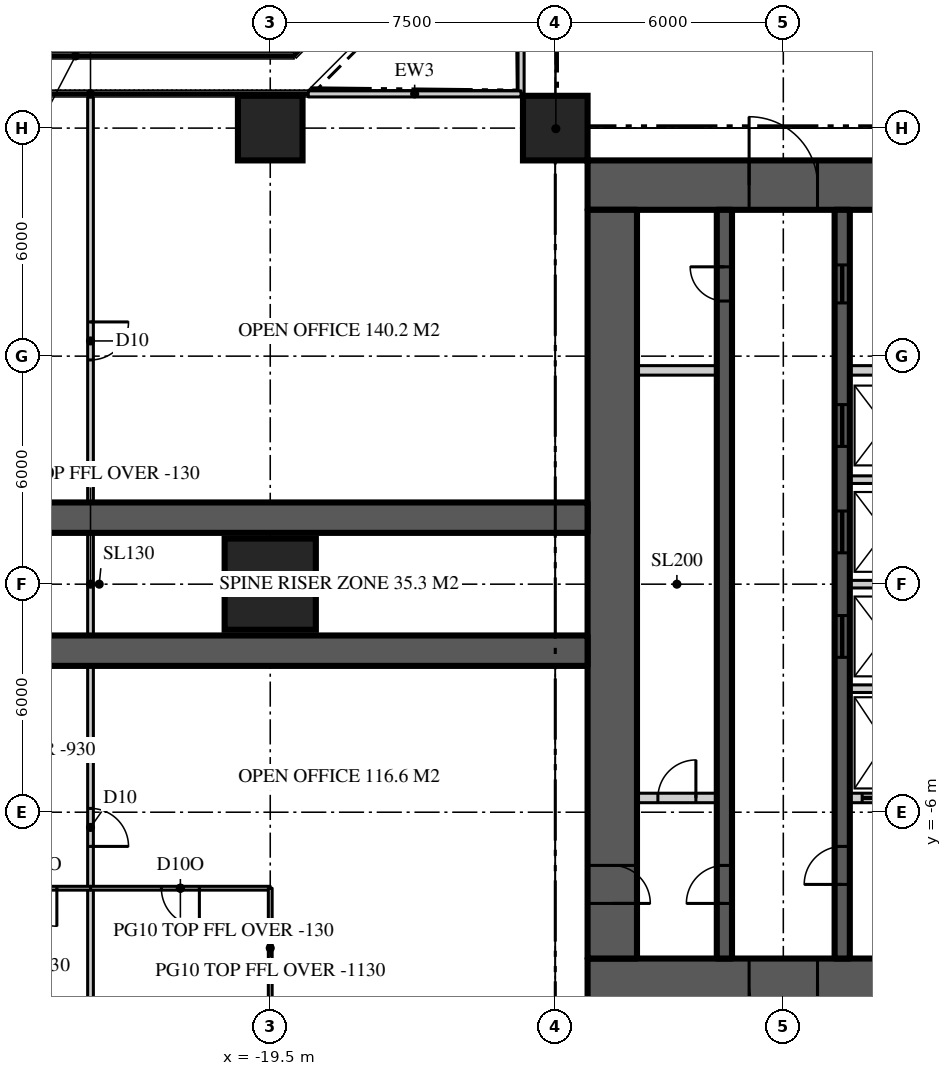
"""IFC4 building model, lengths in metres.
Left out: names, types, materials, properties, quantities, classifications, styles, units other than length and angle.
Written with IfcOpenShell. Run it as: python <this file> out.ifc"""

import sys

from ifc_helpers import new_model, si_unit, direction, frame, frame_2d, origin, origin_2d, place, context, subcontext, project, spatial, rectangle, extrude, element, fill, save


model = new_model("IFC4")
c1 = context("Model", 3, precision=1e-05, world=origin(), true_north=direction((0.0, 1.0)))
c2 = subcontext(c1, "Body", "Model", "MODEL_VIEW")
j1 = project(units=[si_unit("LENGTHUNIT", "METRE"), si_unit("PLANEANGLEUNIT", "RADIAN")], contexts=[c1])
p1 = place(None, origin())
s1 = spatial("IfcSite", under=j1, at=p1, CompositionType="ELEMENT")
p2 = place(p1, origin())
s2 = spatial("IfcBuilding", under=s1, at=p2, CompositionType="ELEMENT")
p3 = place(p2, frame((0.0, 0.0, 186.6)))
s3 = spatial("IfcBuildingStorey", under=s2, at=p3, CompositionType="ELEMENT", Elevation=186.6)
p4 = place(p3, frame((-11.15, 10.5, 0.0), z_axis=(0.0, 0.0, 1.0), x_axis=(1.0, 0.0, 0.0)))
e1 = element("IfcWall", 1, at=p4, inside=s3, PredefinedType="SHEAR", context=c2, shape_type="SweptSolid", body=[
    extrude(rectangle(XDim=22.3, YDim=1.3, at=frame_2d((11.15, 0.0))), origin(), (0.0, 0.0, 1.0), 3.9),
])
p5 = place(p4, frame((4.25, 0.0, 0.0)))
e2 = element("IfcOpeningElement", 2, at=p5, cuts=e1, PredefinedType="OPENING", context=c2, shape_type="SweptSolid", body=[
    extrude(rectangle(XDim=1.8, YDim=2.2, at=frame_2d((0.9, 1.1))), frame((0.0, 0.66, 0.0), z_axis=(0.0, -1.0, 0.0), x_axis=(1.0, 0.0, 0.0)), (0.0, 0.0, 1.0), 1.32),
])
p6 = place(p4, frame((16.25, 0.0, 0.0)))
e3 = element("IfcOpeningElement", 3, at=p6, cuts=e1, PredefinedType="OPENING", context=c2, shape_type="SweptSolid", body=[
    extrude(rectangle(XDim=1.8, YDim=2.2, at=frame_2d((0.9, 1.1))), frame((0.0, 0.66, 0.0), z_axis=(0.0, -1.0, 0.0), x_axis=(1.0, 0.0, 0.0)), (0.0, 0.0, 1.0), 1.32),
])
p7 = place(p3, frame((11.15, -10.5, 0.0), z_axis=(0.0, 0.0, 1.0), x_axis=(-1.0, 0.0, 0.0)))
e4 = element("IfcWall", 4, at=p7, inside=s3, PredefinedType="SHEAR", context=c2, shape_type="SweptSolid", body=[
    extrude(rectangle(XDim=22.3, YDim=1.3, at=frame_2d((11.15, 0.0))), origin(), (0.0, 0.0, 1.0), 3.9),
])
p8 = place(p7, frame((16.25, 0.0, 0.0)))
e5 = element("IfcOpeningElement", 5, at=p8, cuts=e4, PredefinedType="OPENING", context=c2, shape_type="SweptSolid", body=[
    extrude(rectangle(XDim=1.8, YDim=2.2, at=frame_2d((0.9, 1.1))), frame((0.0, 0.66, 0.0), z_axis=(0.0, -1.0, 0.0), x_axis=(1.0, 0.0, 0.0)), (0.0, 0.0, 1.0), 1.32),
])
p9 = place(p7, frame((4.25, 0.0, 0.0)))
e6 = element("IfcOpeningElement", 6, at=p9, cuts=e4, PredefinedType="OPENING", context=c2, shape_type="SweptSolid", body=[
    extrude(rectangle(XDim=1.8, YDim=2.2, at=frame_2d((0.9, 1.1))), frame((0.0, 0.66, 0.0), z_axis=(0.0, -1.0, 0.0), x_axis=(1.0, 0.0, 0.0)), (0.0, 0.0, 1.0), 1.32),
])
p10 = place(p3, frame((-10.5, 9.85, 0.0), z_axis=(0.0, 0.0, 1.0), x_axis=(0.0, -1.0, 0.0)))
e7 = element("IfcWall", 7, at=p10, inside=s3, PredefinedType="SHEAR", context=c2, shape_type="SweptSolid", body=[
    extrude(rectangle(XDim=19.7, YDim=1.3, at=frame_2d((9.85, 0.0))), origin(), (0.0, 0.0, 1.0), 3.9),
])
p11 = place(p10, frame((17.25, 0.0, 0.0)))
e8 = element("IfcOpeningElement", 8, at=p11, cuts=e7, PredefinedType="OPENING", context=c2, shape_type="SweptSolid", body=[
    extrude(rectangle(XDim=1.0, YDim=2.2, at=frame_2d((0.5, 1.1))), frame((0.0, 0.66, 0.0), z_axis=(0.0, -1.0, 0.0), x_axis=(1.0, 0.0, 0.0)), (0.0, 0.0, 1.0), 1.32),
])
for number, where, z_axis, x_axis in (
    (9, (-11.15, 1.75, 0.0), (0.0, 0.0, 1.0), (-1.0, 0.0, 0.0)),
    (10, (-11.15, -1.75, 0.0), (0.0, 0.0, 1.0), (-1.0, 0.0, 0.0)),
):
    element("IfcWall", number, at=place(p3, frame(where, z_axis=z_axis, x_axis=x_axis)), inside=s3, PredefinedType="SHEAR", context=c2, shape_type="SweptSolid", body=[
        extrude(rectangle(XDim=15.25, YDim=0.8, at=frame_2d((7.625, 0.0))), origin(), (0.0, 0.0, 1.0), 3.9),
    ])
p12 = place(p3, frame((-19.5, 0.0, 0.0), z_axis=(0.0, 0.0, 1.0), x_axis=(1.0, 0.0, 0.0)))
e11 = element("IfcColumn", 11, at=p12, inside=s3, PredefinedType="COLUMN", context=c2, shape_type="SweptSolid", body=[
    extrude(rectangle(XDim=2.4, YDim=2.4, at=origin_2d()), origin(), (0.0, 0.0, 1.0), 3.9),
])
for number, where, z_axis, x_axis in (
    (12, (-19.5, 12.0, 0.0), (0.0, 0.0, 1.0), (1.0, 0.0, 0.0)),
    (13, (-12.0, 12.0, 0.0), (0.0, 0.0, 1.0), (1.0, 0.0, 0.0)),
):
    element("IfcColumn", number, at=place(p3, frame(where, z_axis=z_axis, x_axis=x_axis)), inside=s3, PredefinedType="COLUMN", context=c2, shape_type="SweptSolid", body=[
        extrude(rectangle(XDim=1.7, YDim=1.7, at=origin_2d()), origin(), (0.0, 0.0, 1.0), 3.9),
    ])
p13 = place(p3, frame((-12.9, 18.5, 0.0), z_axis=(0.0, 0.0, 1.0), x_axis=(0.0, -1.0, 0.0)))
e14 = element("IfcWall", 14, at=p13, inside=s3, PredefinedType="SOLIDWALL", context=c2, shape_type="SweptSolid", body=[
    extrude(rectangle(XDim=5.6, YDim=0.16, at=frame_2d((2.8, 0.0))), origin(), (0.0, 0.0, 1.0), 3.77),
])
p14 = place(p13, frame((2.3, 0.0, 0.0)))
e15 = element("IfcOpeningElement", 15, at=p14, cuts=e14, PredefinedType="OPENING", context=c2, shape_type="SweptSolid", body=[
    extrude(rectangle(XDim=1.0, YDim=2.2, at=frame_2d((0.5, 1.1))), frame((0.0, 0.09, 0.0), z_axis=(0.0, -1.0, 0.0), x_axis=(1.0, 0.0, 0.0)), (0.0, 0.0, 1.0), 0.18),
])
p15 = place(p3, frame((-12.9, 12.9, 0.0), z_axis=(0.0, 0.0, 1.0), x_axis=(-1.0, 0.0, 0.0)))
e16 = element("IfcWall", 16, at=p15, inside=s3, PredefinedType="SOLIDWALL", context=c2, shape_type="SweptSolid", body=[
    extrude(rectangle(XDim=5.6, YDim=0.16, at=frame_2d((2.8, 0.0))), origin(), (0.0, 0.0, 1.0), 3.77),
])
p16 = place(p3, frame((-7.55, -9.85, 0.0), z_axis=(0.0, 0.0, 1.0), x_axis=(0.0, 1.0, 0.0)))
e17 = element("IfcWall", 17, at=p16, inside=s3, PredefinedType="SHEAR", context=c2, shape_type="SweptSolid", body=[
    extrude(rectangle(XDim=19.7, YDim=0.4, at=frame_2d((9.85, 0.0))), origin(), (0.0, 0.0, 1.0), 3.9),
])
p17 = place(p16, frame((1.45, 0.0, 0.0)))
e18 = element("IfcOpeningElement", 18, at=p17, cuts=e17, PredefinedType="OPENING", context=c2, shape_type="SweptSolid", body=[
    extrude(rectangle(XDim=1.0, YDim=2.2, at=frame_2d((0.5, 1.1))), frame((0.0, 0.21, 0.0), z_axis=(0.0, -1.0, 0.0), x_axis=(1.0, 0.0, 0.0)), (0.0, 0.0, 1.0), 0.42),
])
p18 = place(p16, frame((17.3, 0.0, 0.0)))
e19 = element("IfcOpeningElement", 19, at=p18, cuts=e17, PredefinedType="OPENING", context=c2, shape_type="SweptSolid", body=[
    extrude(rectangle(XDim=0.9, YDim=2.1, at=frame_2d((0.45, 1.05))), frame((0.0, 0.21, 0.0), z_axis=(0.0, -1.0, 0.0), x_axis=(1.0, 0.0, 0.0)), (0.0, 0.0, 1.0), 0.42),
])
p19 = place(p3, frame((-4.45, -9.85, 0.0), z_axis=(0.0, 0.0, 1.0), x_axis=(0.0, 1.0, 0.0)))
e20 = element("IfcWall", 20, at=p19, inside=s3, PredefinedType="SHEAR", context=c2, shape_type="SweptSolid", body=[
    extrude(rectangle(XDim=19.7, YDim=0.4, at=frame_2d((9.85, 0.0))), origin(), (0.0, 0.0, 1.0), 3.9),
])
p20 = place(p19, frame((1.95, 0.0, 0.0)))
e21 = element("IfcOpeningElement", 21, at=p20, cuts=e20, PredefinedType="OPENING", context=c2, shape_type="SweptSolid", body=[
    extrude(rectangle(XDim=1.0, YDim=2.2, at=frame_2d((0.5, 1.1))), frame((0.0, 0.21, 0.0), z_axis=(0.0, -1.0, 0.0), x_axis=(1.0, 0.0, 0.0)), (0.0, 0.0, 1.0), 0.42),
])
p21 = place(p19, frame((17.25, 0.0, 0.0)))
e22 = element("IfcOpeningElement", 22, at=p21, cuts=e20, PredefinedType="OPENING", context=c2, shape_type="SweptSolid", body=[
    extrude(rectangle(XDim=1.0, YDim=2.1, at=frame_2d((0.5, 1.05))), frame((0.0, 0.21, 0.0), z_axis=(0.0, -1.0, 0.0), x_axis=(1.0, 0.0, 0.0)), (0.0, 0.0, 1.0), 0.42),
])
p22 = place(p19, frame((7.925, 0.0, 0.0)))
e23 = element("IfcOpeningElement", 23, at=p22, cuts=e20, PredefinedType="OPENING", context=c2, shape_type="SweptSolid", body=[
    extrude(rectangle(XDim=1.1, YDim=2.2, at=frame_2d((0.55, 1.1))), frame((0.0, 0.21, 0.0), z_axis=(0.0, -1.0, 0.0), x_axis=(1.0, 0.0, 0.0)), (0.0, 0.0, 1.0), 0.42),
])
p23 = place(p19, frame((10.675, 0.0, 0.0)))
e24 = element("IfcOpeningElement", 24, at=p23, cuts=e20, PredefinedType="OPENING", context=c2, shape_type="SweptSolid", body=[
    extrude(rectangle(XDim=1.1, YDim=2.2, at=frame_2d((0.55, 1.1))), frame((0.0, 0.21, 0.0), z_axis=(0.0, -1.0, 0.0), x_axis=(1.0, 0.0, 0.0)), (0.0, 0.0, 1.0), 0.42),
])
p24 = place(p19, frame((13.475, 0.0, 0.0)))
e25 = element("IfcOpeningElement", 25, at=p24, cuts=e20, PredefinedType="OPENING", context=c2, shape_type="SweptSolid", body=[
    extrude(rectangle(XDim=1.1, YDim=2.2, at=frame_2d((0.55, 1.1))), frame((0.0, 0.21, 0.0), z_axis=(0.0, -1.0, 0.0), x_axis=(1.0, 0.0, 0.0)), (0.0, 0.0, 1.0), 0.42),
])
p25 = place(p3, frame((-9.85, 5.625, 0.0), z_axis=(0.0, 0.0, 1.0), x_axis=(1.0, 0.0, 0.0)))
e26 = element("IfcWall", 26, at=p25, inside=s3, PredefinedType="SOLIDWALL", context=c2, shape_type="SweptSolid", body=[
    extrude(rectangle(XDim=2.1, YDim=0.25, at=frame_2d((1.05, 0.0))), origin(), (0.0, 0.0, 1.0), 3.7),
])
p26 = place(p3, frame((-4.25, 5.625, 0.0), z_axis=(0.0, 0.0, 1.0), x_axis=(1.0, 0.0, 0.0)))
e27 = element("IfcWall", 27, at=p26, inside=s3, PredefinedType="SOLIDWALL", context=c2, shape_type="SweptSolid", body=[
    extrude(rectangle(XDim=1.85, YDim=0.25, at=frame_2d((0.925, 0.0))), origin(), (0.0, 0.0, 1.0), 3.7),
])
p27 = place(p3, frame((-9.85, -5.625, 0.0), z_axis=(0.0, 0.0, 1.0), x_axis=(1.0, 0.0, 0.0)))
e28 = element("IfcWall", 28, at=p27, inside=s3, PredefinedType="SOLIDWALL", context=c2, shape_type="SweptSolid", body=[
    extrude(rectangle(XDim=2.1, YDim=0.25, at=frame_2d((1.05, 0.0))), origin(), (0.0, 0.0, 1.0), 3.7),
])
p28 = place(p27, frame((0.55, 0.0, 0.0)))
e29 = element("IfcOpeningElement", 29, at=p28, cuts=e28, PredefinedType="OPENING", context=c2, shape_type="SweptSolid", body=[
    extrude(rectangle(XDim=1.0, YDim=2.2, at=frame_2d((0.5, 1.1))), frame((0.0, 0.135, 0.0), z_axis=(0.0, -1.0, 0.0), x_axis=(1.0, 0.0, 0.0)), (0.0, 0.0, 1.0), 0.27),
])
p29 = place(p3, frame((-4.25, -5.625, 0.0), z_axis=(0.0, 0.0, 1.0), x_axis=(1.0, 0.0, 0.0)))
e30 = element("IfcWall", 30, at=p29, inside=s3, PredefinedType="SOLIDWALL", context=c2, shape_type="SweptSolid", body=[
    extrude(rectangle(XDim=1.85, YDim=0.25, at=frame_2d((0.925, 0.0))), origin(), (0.0, 0.0, 1.0), 3.7),
])
p30 = place(p29, frame((0.325, 0.0, 0.0)))
e31 = element("IfcOpeningElement", 31, at=p30, cuts=e30, PredefinedType="OPENING", context=c2, shape_type="SweptSolid", body=[
    extrude(rectangle(XDim=1.2, YDim=2.2, at=frame_2d((0.6, 1.1))), frame((0.0, 0.135, 0.0), z_axis=(0.0, -1.0, 0.0), x_axis=(1.0, 0.0, 0.0)), (0.0, 0.0, 1.0), 0.27),
])
for number, where, z_axis, x_axis in (
    (32, (-4.25, -2.75, 0.0), (0.0, 0.0, 1.0), (1.0, 0.0, 0.0)),
    (33, (-4.25, 0.0, 0.0), (0.0, 0.0, 1.0), (1.0, 0.0, 0.0)),
    (34, (-4.25, 2.75, 0.0), (0.0, 0.0, 1.0), (1.0, 0.0, 0.0)),
):
    element("IfcWall", number, at=place(p3, frame(where, z_axis=z_axis, x_axis=x_axis)), inside=s3, PredefinedType="SOLIDWALL", context=c2, shape_type="SweptSolid", body=[
        extrude(rectangle(XDim=1.85, YDim=0.2, at=frame_2d((0.925, 0.0))), origin(), (0.0, 0.0, 1.0), 3.7),
    ])
p31 = place(p3, frame((-24.229, 12.82, 0.0), z_axis=(0.0, 0.0, 1.0), x_axis=(0.0, -1.0, 0.0)))
e35 = element("IfcWall", 35, at=p31, inside=s3, PredefinedType="PARTITIONING", context=c2, shape_type="SweptSolid", body=[
    extrude(rectangle(XDim=25.64, YDim=0.15, at=frame_2d((12.82, 0.0))), origin(), (0.0, 0.0, 1.0), 3.77),
])
p32 = place(p31, frame((18.72, 0.0, 0.0)))
e36 = element("IfcOpeningElement", 36, at=p32, cuts=e35, PredefinedType="OPENING", context=c2, shape_type="SweptSolid", body=[
    extrude(rectangle(XDim=1.0, YDim=2.2, at=frame_2d((0.5, 1.1))), frame((0.0, 0.085, 0.0), z_axis=(0.0, -1.0, 0.0), x_axis=(1.0, 0.0, 0.0)), (0.0, 0.0, 1.0), 0.17),
])
p33 = place(p31, frame((5.92, 0.0, 0.0)))
e37 = element("IfcOpeningElement", 37, at=p33, cuts=e35, PredefinedType="OPENING", context=c2, shape_type="SweptSolid", body=[
    extrude(rectangle(XDim=1.0, YDim=2.2, at=frame_2d((0.5, 1.1))), frame((0.0, 0.085, 0.0), z_axis=(0.0, -1.0, 0.0), x_axis=(1.0, 0.0, 0.0)), (0.0, 0.0, 1.0), 0.17),
])
p34 = place(p3, frame((-19.5, -8.0, 0.0), z_axis=(0.0, 0.0, 1.0), x_axis=(-1.0, 0.0, 0.0)))
e38 = element("IfcWall", 38, at=p34, inside=s3, PredefinedType="PARTITIONING", context=c2, shape_type="SweptSolid", body=[
    extrude(rectangle(XDim=4.729, YDim=0.1, at=frame_2d((2.365, 0.0))), origin(), (0.0, 0.0, 1.0), 3.77),
])
p35 = place(p34, frame((1.865, 0.0, 0.0)))
e39 = element("IfcOpeningElement", 39, at=p35, cuts=e38, PredefinedType="OPENING", context=c2, shape_type="SweptSolid", body=[
    extrude(rectangle(XDim=1.0, YDim=2.2, at=frame_2d((0.5, 1.1))), frame((0.0, 0.06, 0.0), z_axis=(0.0, -1.0, 0.0), x_axis=(1.0, 0.0, 0.0)), (0.0, 0.0, 1.0), 0.12),
])
p36 = place(p3, frame((-24.229, -8.0, 0.0), z_axis=(0.0, 0.0, 1.0), x_axis=(-1.0, 0.0, 0.0)))
e40 = element("IfcWall", 40, at=p36, inside=s3, PredefinedType="PARTITIONING", context=c2, shape_type="SweptSolid", body=[
    extrude(rectangle(XDim=2.771, YDim=0.1, at=frame_2d((1.385, 0.0))), origin(), (0.0, 0.0, 1.0), 3.77),
])
p37 = place(p36, frame((0.885, 0.0, 0.0)))
e41 = element("IfcOpeningElement", 41, at=p37, cuts=e40, PredefinedType="OPENING", context=c2, shape_type="SweptSolid", body=[
    extrude(rectangle(XDim=1.0, YDim=2.2, at=frame_2d((0.5, 1.1))), frame((0.0, 0.06, 0.0), z_axis=(0.0, -1.0, 0.0), x_axis=(1.0, 0.0, 0.0)), (0.0, 0.0, 1.0), 0.12),
])
p38 = place(p3, frame((-19.5, -8.0, 0.0), z_axis=(0.0, 0.0, 1.0), x_axis=(0.0, -1.0, 0.0)))
e42 = element("IfcWall", 42, at=p38, inside=s3, PredefinedType="PARTITIONING", context=c2, shape_type="SweptSolid", body=[
    extrude(rectangle(XDim=3.15, YDim=0.1, at=frame_2d((1.575, 0.0))), origin(), (0.0, 0.0, 1.0), 2.77),
])
p39 = place(p3, frame((-11.15, 11.15, 0.0), z_axis=(0.0, 0.0, 1.0), x_axis=(-0.707106781187, 0.707106781187, 0.0)))
e43 = element("IfcWall", 43, at=p39, inside=s3, PredefinedType="PARTITIONING", context=c2, shape_type="SweptSolid", body=[
    extrude(rectangle(XDim=2.362, YDim=0.15, at=frame_2d((1.181, 0.0))), origin(), (0.0, 0.0, 1.0), 3.22),
])
p40 = place(p5, origin())
e44 = element("IfcDoor", 44, at=p40, inside=s3, OperationType="DOUBLE_DOOR_DOUBLE_SWING", PredefinedType="DOOR", context=c2, shape_type="SweptSolid", body=[
    extrude(rectangle(XDim=1.8, YDim=2.2, at=frame_2d((0.9, 1.1))), frame((0.0, 0.025, 0.0), z_axis=(0.0, -1.0, 0.0), x_axis=(1.0, 0.0, 0.0)), (0.0, 0.0, 1.0), 0.05),
])
fill(e2, e44)
p41 = place(p8, origin())
e45 = element("IfcDoor", 45, at=p41, inside=s3, OperationType="DOUBLE_DOOR_DOUBLE_SWING", PredefinedType="DOOR", context=c2, shape_type="SweptSolid", body=[
    extrude(rectangle(XDim=1.8, YDim=2.2, at=frame_2d((0.9, 1.1))), frame((0.0, 0.025, 0.0), z_axis=(0.0, -1.0, 0.0), x_axis=(1.0, 0.0, 0.0)), (0.0, 0.0, 1.0), 0.05),
])
fill(e5, e45)
p42 = place(p17, origin())
e46 = element("IfcDoor", 46, at=p42, inside=s3, OperationType="SINGLE_SWING_LEFT", PredefinedType="DOOR", context=c2, shape_type="SweptSolid", body=[
    extrude(rectangle(XDim=1.0, YDim=2.2, at=frame_2d((0.5, 1.1))), frame((0.0, 0.025, 0.0), z_axis=(0.0, -1.0, 0.0), x_axis=(1.0, 0.0, 0.0)), (0.0, 0.0, 1.0), 0.05),
])
fill(e18, e46)
p43 = place(p11, origin())
e47 = element("IfcDoor", 47, at=p43, inside=s3, OperationType="SINGLE_SWING_RIGHT", PredefinedType="DOOR", context=c2, shape_type="SweptSolid", body=[
    extrude(rectangle(XDim=1.0, YDim=2.2, at=frame_2d((0.5, 1.1))), frame((0.0, 0.025, 0.0), z_axis=(0.0, -1.0, 0.0), x_axis=(1.0, 0.0, 0.0)), (0.0, 0.0, 1.0), 0.05),
])
fill(e8, e47)
p44 = place(p20, origin())
e48 = element("IfcDoor", 48, at=p44, inside=s3, OperationType="SINGLE_SWING_LEFT", PredefinedType="DOOR", context=c2, shape_type="SweptSolid", body=[
    extrude(rectangle(XDim=1.0, YDim=2.2, at=frame_2d((0.5, 1.1))), frame((0.0, 0.025, 0.0), z_axis=(0.0, -1.0, 0.0), x_axis=(1.0, 0.0, 0.0)), (0.0, 0.0, 1.0), 0.05),
])
fill(e21, e48)
p45 = place(p18, origin())
e49 = element("IfcDoor", 49, at=p45, inside=s3, OperationType="SINGLE_SWING_RIGHT", PredefinedType="DOOR", context=c2, shape_type="SweptSolid", body=[
    extrude(rectangle(XDim=0.9, YDim=2.1, at=frame_2d((0.45, 1.05))), frame((0.0, 0.025, 0.0), z_axis=(0.0, -1.0, 0.0), x_axis=(1.0, 0.0, 0.0)), (0.0, 0.0, 1.0), 0.05),
])
fill(e19, e49)
p46 = place(p21, origin())
e50 = element("IfcDoor", 50, at=p46, inside=s3, OperationType="SLIDING_TO_LEFT", PredefinedType="DOOR", context=c2, shape_type="SweptSolid", body=[
    extrude(rectangle(XDim=1.0, YDim=2.1, at=frame_2d((0.5, 1.05))), frame((0.0, 0.025, 0.0), z_axis=(0.0, -1.0, 0.0), x_axis=(1.0, 0.0, 0.0)), (0.0, 0.0, 1.0), 0.05),
])
fill(e22, e50)
p47 = place(p22, origin())
e51 = element("IfcDoor", 51, at=p47, inside=s3, OperationType="SLIDING_TO_LEFT", PredefinedType="DOOR", context=c2, shape_type="SweptSolid", body=[
    extrude(rectangle(XDim=1.1, YDim=2.2, at=frame_2d((0.55, 1.1))), frame((0.0, 0.025, 0.0), z_axis=(0.0, -1.0, 0.0), x_axis=(1.0, 0.0, 0.0)), (0.0, 0.0, 1.0), 0.05),
])
fill(e23, e51)
p48 = place(p23, origin())
e52 = element("IfcDoor", 52, at=p48, inside=s3, OperationType="SLIDING_TO_LEFT", PredefinedType="DOOR", context=c2, shape_type="SweptSolid", body=[
    extrude(rectangle(XDim=1.1, YDim=2.2, at=frame_2d((0.55, 1.1))), frame((0.0, 0.025, 0.0), z_axis=(0.0, -1.0, 0.0), x_axis=(1.0, 0.0, 0.0)), (0.0, 0.0, 1.0), 0.05),
])
fill(e24, e52)
p49 = place(p24, origin())
e53 = element("IfcDoor", 53, at=p49, inside=s3, OperationType="SLIDING_TO_LEFT", PredefinedType="DOOR", context=c2, shape_type="SweptSolid", body=[
    extrude(rectangle(XDim=1.1, YDim=2.2, at=frame_2d((0.55, 1.1))), frame((0.0, 0.025, 0.0), z_axis=(0.0, -1.0, 0.0), x_axis=(1.0, 0.0, 0.0)), (0.0, 0.0, 1.0), 0.05),
])
fill(e25, e53)
p50 = place(p30, origin())
e54 = element("IfcDoor", 54, at=p50, inside=s3, OperationType="SLIDING_TO_LEFT", PredefinedType="DOOR", context=c2, shape_type="SweptSolid", body=[
    extrude(rectangle(XDim=1.2, YDim=2.2, at=frame_2d((0.6, 1.1))), frame((0.0, 0.025, 0.0), z_axis=(0.0, -1.0, 0.0), x_axis=(1.0, 0.0, 0.0)), (0.0, 0.0, 1.0), 0.05),
])
fill(e31, e54)
p51 = place(p32, origin())
e55 = element("IfcDoor", 55, at=p51, inside=s3, OperationType="SINGLE_SWING_RIGHT", PredefinedType="DOOR", context=c2, shape_type="SweptSolid", body=[
    extrude(rectangle(XDim=1.0, YDim=2.2, at=frame_2d((0.5, 1.1))), frame((0.0, 0.025, 0.0), z_axis=(0.0, -1.0, 0.0), x_axis=(1.0, 0.0, 0.0)), (0.0, 0.0, 1.0), 0.05),
])
fill(e36, e55)
p52 = place(p33, origin())
e56 = element("IfcDoor", 56, at=p52, inside=s3, OperationType="SINGLE_SWING_LEFT", PredefinedType="DOOR", context=c2, shape_type="SweptSolid", body=[
    extrude(rectangle(XDim=1.0, YDim=2.2, at=frame_2d((0.5, 1.1))), frame((0.0, 0.025, 0.0), z_axis=(0.0, -1.0, 0.0), x_axis=(1.0, 0.0, 0.0)), (0.0, 0.0, 1.0), 0.05),
])
fill(e37, e56)
p53 = place(p35, origin())
e57 = element("IfcDoor", 57, at=p53, inside=s3, OperationType="SINGLE_SWING_LEFT", PredefinedType="DOOR", context=c2, shape_type="SweptSolid", body=[
    extrude(rectangle(XDim=1.0, YDim=2.2, at=frame_2d((0.5, 1.1))), frame((0.0, 0.025, 0.0), z_axis=(0.0, -1.0, 0.0), x_axis=(1.0, 0.0, 0.0)), (0.0, 0.0, 1.0), 0.05),
])
fill(e39, e57)
p54 = place(p37, origin())
e58 = element("IfcDoor", 58, at=p54, inside=s3, OperationType="SINGLE_SWING_LEFT", PredefinedType="DOOR", context=c2, shape_type="SweptSolid", body=[
    extrude(rectangle(XDim=1.0, YDim=2.2, at=frame_2d((0.5, 1.1))), frame((0.0, 0.025, 0.0), z_axis=(0.0, -1.0, 0.0), x_axis=(1.0, 0.0, 0.0)), (0.0, 0.0, 1.0), 0.05),
])
fill(e41, e58)
p55 = place(p28, origin())
e59 = element("IfcDoor", 59, at=p55, inside=s3, OperationType="SINGLE_SWING_RIGHT", PredefinedType="DOOR", context=c2, shape_type="SweptSolid", body=[
    extrude(rectangle(XDim=1.0, YDim=2.2, at=frame_2d((0.5, 1.1))), frame((0.0, 0.025, 0.0), z_axis=(0.0, -1.0, 0.0), x_axis=(1.0, 0.0, 0.0)), (0.0, 0.0, 1.0), 0.05),
])
fill(e29, e59)
save(model, sys.argv[1])
